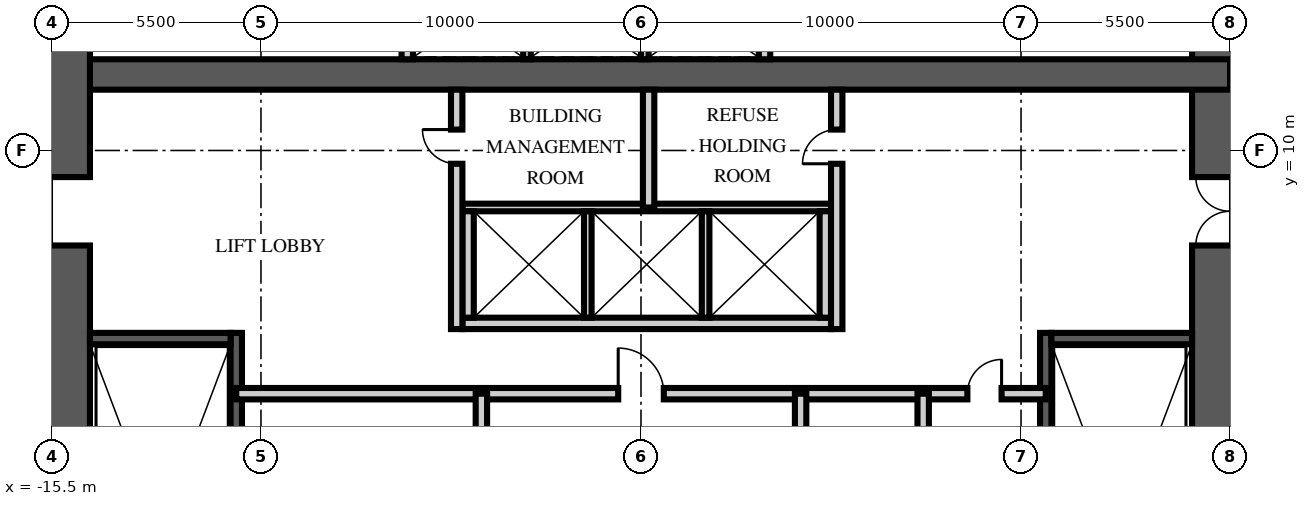
"""IFC4 building model, lengths in metres.
Left out: names, types, materials, properties, quantities, classifications, styles, units other than length and angle.
Written with IfcOpenShell. Run it as: python <this file> out.ifc"""

import sys

from ifc_helpers import new_model, si_unit, direction, frame, frame_2d, origin, place, context, subcontext, project, spatial, rectangle, extrude, element, fill, save


model = new_model("IFC4")
c1 = context("Model", 3, precision=1e-05, world=origin(), true_north=direction((0.0, 1.0)))
c2 = subcontext(c1, "Body", "Model", "MODEL_VIEW")
j1 = project(units=[si_unit("LENGTHUNIT", "METRE"), si_unit("PLANEANGLEUNIT", "RADIAN")], contexts=[c1])
p1 = place(None, origin())
s1 = spatial("IfcSite", under=j1, at=p1, CompositionType="ELEMENT")
p2 = place(p1, origin())
s2 = spatial("IfcBuilding", under=s1, at=p2, CompositionType="ELEMENT")
p3 = place(p2, frame((0.0, 0.0, 47.25)))
s3 = spatial("IfcBuildingStorey", under=s2, at=p3, CompositionType="ELEMENT", Elevation=47.25)
p4 = place(p3, frame((15.5, -15.5, -0.25), z_axis=(0.0, 0.0, 1.0), x_axis=(0.0, 1.0, 0.0)))
e1 = element("IfcWall", 1, at=p4, inside=s3, PredefinedType="SHEAR", context=c2, shape_type="SweptSolid", body=[
    extrude(rectangle(XDim=31.0, YDim=2.0, at=frame_2d((15.5, 0.0))), origin(), (0.0, 0.0, 1.0), 3.75),
])
p5 = place(p4, frame((6.5, 0.0, 0.25)))
e2 = element("IfcOpeningElement", 2, at=p5, cuts=e1, PredefinedType="OPENING", context=c2, shape_type="SweptSolid", body=[
    extrude(rectangle(XDim=1.2, YDim=2.1, at=frame_2d((0.6, 1.05))), frame((0.0, 1.01, 0.0), z_axis=(0.0, -1.0, 0.0), x_axis=(1.0, 0.0, 0.0)), (0.0, 0.0, 1.0), 2.02),
])
p6 = place(p4, frame((23.0, 0.0, 0.25)))
e3 = element("IfcOpeningElement", 3, at=p6, cuts=e1, PredefinedType="OPENING", context=c2, shape_type="SweptSolid", body=[
    extrude(rectangle(XDim=1.8, YDim=2.1, at=frame_2d((0.9, 1.05))), frame((0.0, 1.01, 0.0), z_axis=(0.0, -1.0, 0.0), x_axis=(1.0, 0.0, 0.0)), (0.0, 0.0, 1.0), 2.02),
])
p7 = place(p3, frame((-15.5, 12.0, -0.25), z_axis=(0.0, 0.0, 1.0), x_axis=(1.0, 0.0, 0.0)))
e4 = element("IfcWall", 4, at=p7, inside=s3, PredefinedType="SHEAR", context=c2, shape_type="SweptSolid", body=[
    extrude(rectangle(XDim=31.0, YDim=0.8, at=frame_2d((15.5, 0.0))), origin(), (0.0, 0.0, 1.0), 3.75),
])
p8 = place(p3, frame((-15.5, -15.5, -0.25), z_axis=(0.0, 0.0, 1.0), x_axis=(0.0, 1.0, 0.0)))
e5 = element("IfcWall", 5, at=p8, inside=s3, PredefinedType="SHEAR", context=c2, shape_type="SweptSolid", body=[
    extrude(rectangle(XDim=31.0, YDim=2.0, at=frame_2d((15.5, 0.0))), origin(), (0.0, 0.0, 1.0), 3.75),
])
p9 = place(p8, frame((6.5, 0.0, 0.25)))
e6 = element("IfcOpeningElement", 6, at=p9, cuts=e5, PredefinedType="OPENING", context=c2, shape_type="SweptSolid", body=[
    extrude(rectangle(XDim=1.2, YDim=2.1, at=frame_2d((0.6, 1.05))), frame((0.0, 1.01, 0.0), z_axis=(0.0, -1.0, 0.0), x_axis=(1.0, 0.0, 0.0)), (0.0, 0.0, 1.0), 2.02),
])
p10 = place(p8, frame((23.0, 0.0, 0.25)))
e7 = element("IfcOpeningElement", 7, at=p10, cuts=e5, PredefinedType="OPENING", context=c2, shape_type="SweptSolid", body=[
    extrude(rectangle(XDim=1.8, YDim=2.1, at=frame_2d((0.9, 1.05))), frame((0.0, 1.01, 0.0), z_axis=(0.0, -1.0, 0.0), x_axis=(1.0, 0.0, 0.0)), (0.0, 0.0, 1.0), 2.02),
])
p11 = place(p3, frame((-10.65, -4.9, 0.0), z_axis=(0.0, 0.0, 1.0), x_axis=(0.0, 1.0, 0.0)))
e8 = element("IfcWall", 8, at=p11, inside=s3, PredefinedType="SOLIDWALL", context=c2, shape_type="SweptSolid", body=[
    extrude(rectangle(XDim=10.1, YDim=0.3, at=frame_2d((5.05, 0.0))), origin(), (0.0, 0.0, 1.0), 3.5),
])
p12 = place(p3, frame((-14.5, 5.05, 0.0), z_axis=(0.0, 0.0, 1.0), x_axis=(1.0, 0.0, 0.0)))
e9 = element("IfcWall", 9, at=p12, inside=s3, PredefinedType="SOLIDWALL", context=c2, shape_type="SweptSolid", body=[
    extrude(rectangle(XDim=3.7, YDim=0.3, at=frame_2d((1.85, 0.0))), origin(), (0.0, 0.0, 1.0), 3.5),
])
p13 = place(p3, frame((10.65, -4.9, 0.0), z_axis=(0.0, 0.0, 1.0), x_axis=(0.0, 1.0, 0.0)))
e10 = element("IfcWall", 10, at=p13, inside=s3, PredefinedType="SOLIDWALL", context=c2, shape_type="SweptSolid", body=[
    extrude(rectangle(XDim=10.1, YDim=0.3, at=frame_2d((5.05, 0.0))), origin(), (0.0, 0.0, 1.0), 3.5),
])
p14 = place(p3, frame((14.5, 5.05, 0.0), z_axis=(0.0, 0.0, 1.0), x_axis=(-1.0, 0.0, 0.0)))
e11 = element("IfcWall", 11, at=p14, inside=s3, PredefinedType="SOLIDWALL", context=c2, shape_type="SweptSolid", body=[
    extrude(rectangle(XDim=3.7, YDim=0.3, at=frame_2d((1.85, 0.0))), origin(), (0.0, 0.0, 1.0), 3.5),
])
p15 = place(p3, frame((-4.7, 5.45, 0.0), z_axis=(0.0, 0.0, 1.0), x_axis=(1.0, 0.0, 0.0)))
e12 = element("IfcWall", 12, at=p15, inside=s3, PredefinedType="PARTITIONING", context=c2, shape_type="SweptSolid", body=[
    extrude(rectangle(XDim=9.7, YDim=0.3, at=frame_2d((4.85, 0.0))), origin(), (0.0, 0.0, 1.0), 3.5),
])
p16 = place(p3, frame((-4.7, 8.5, 0.0), z_axis=(0.0, 0.0, 1.0), x_axis=(1.0, 0.0, 0.0)))
e13 = element("IfcWall", 13, at=p16, inside=s3, PredefinedType="PARTITIONING", context=c2, shape_type="SweptSolid", body=[
    extrude(rectangle(XDim=9.7, YDim=0.2, at=frame_2d((4.85, 0.0))), origin(), (0.0, 0.0, 1.0), 3.5),
])
for number, where, z_axis, x_axis in (
    (14, (-4.55, 5.6, 0.0), (0.0, 0.0, 1.0), (0.0, 1.0, 0.0)),
    (15, (4.85, 5.6, 0.0), (0.0, 0.0, 1.0), (0.0, 1.0, 0.0)),
):
    element("IfcWall", number, at=place(p3, frame(where, z_axis=z_axis, x_axis=x_axis)), inside=s3, PredefinedType="PARTITIONING", context=c2, shape_type="SweptSolid", body=[
        extrude(rectangle(XDim=2.8, YDim=0.3, at=frame_2d((1.4, 0.0))), origin(), (0.0, 0.0, 1.0), 3.5),
    ])
for number, where, z_axis, x_axis in (
    (16, (-1.4, 5.6, 0.0), (0.0, 0.0, 1.0), (0.0, 1.0, 0.0)),
    (17, (1.7, 5.6, 0.0), (0.0, 0.0, 1.0), (0.0, 1.0, 0.0)),
):
    element("IfcWall", number, at=place(p3, frame(where, z_axis=z_axis, x_axis=x_axis)), inside=s3, PredefinedType="PARTITIONING", context=c2, shape_type="SweptSolid", body=[
        extrude(rectangle(XDim=2.8, YDim=0.2, at=frame_2d((1.4, 0.0))), origin(), (0.0, 0.0, 1.0), 3.5),
    ])
for number, where, z_axis, x_axis in (
    (18, (-6.15, 12.4, 0.0), (0.0, 0.0, 1.0), (0.0, 1.0, 0.0)),
    (19, (3.25, 12.4, 0.0), (0.0, 0.0, 1.0), (0.0, 1.0, 0.0)),
):
    element("IfcWall", number, at=place(p3, frame(where, z_axis=z_axis, x_axis=x_axis)), inside=s3, PredefinedType="PARTITIONING", context=c2, shape_type="SweptSolid", body=[
        extrude(rectangle(XDim=2.1, YDim=0.3, at=frame_2d((1.05, 0.0))), origin(), (0.0, 0.0, 1.0), 3.5),
    ])
for number, where, z_axis, x_axis in (
    (20, (-3.0, 12.4, 0.0), (0.0, 0.0, 1.0), (0.0, 1.0, 0.0)),
    (21, (0.1, 12.4, 0.0), (0.0, 0.0, 1.0), (0.0, 1.0, 0.0)),
):
    element("IfcWall", number, at=place(p3, frame(where, z_axis=z_axis, x_axis=x_axis)), inside=s3, PredefinedType="PARTITIONING", context=c2, shape_type="SweptSolid", body=[
        extrude(rectangle(XDim=2.1, YDim=0.2, at=frame_2d((1.05, 0.0))), origin(), (0.0, 0.0, 1.0), 3.5),
    ])
p17 = place(p3, frame((-10.65, 3.6, 0.0), z_axis=(0.0, 0.0, 1.0), x_axis=(1.0, 0.0, 0.0)))
e22 = element("IfcWall", 22, at=p17, inside=s3, PredefinedType="PARTITIONING", context=c2, shape_type="SweptSolid", body=[
    extrude(rectangle(XDim=21.3, YDim=0.3, at=frame_2d((10.65, 0.0))), origin(), (0.0, 0.0, 1.0), 3.5),
])
p18 = place(p17, frame((10.05, 0.0, 0.0)))
e23 = element("IfcOpeningElement", 23, at=p18, cuts=e22, PredefinedType="OPENING", context=c2, shape_type="SweptSolid", body=[
    extrude(rectangle(XDim=1.2, YDim=2.1, at=frame_2d((0.6, 1.05))), frame((0.0, 0.16, 0.0), z_axis=(0.0, -1.0, 0.0), x_axis=(1.0, 0.0, 0.0)), (0.0, 0.0, 1.0), 0.32),
])
p19 = place(p17, frame((19.238, 0.0, 0.0)))
e24 = element("IfcOpeningElement", 24, at=p19, cuts=e22, PredefinedType="OPENING", context=c2, shape_type="SweptSolid", body=[
    extrude(rectangle(XDim=0.9, YDim=2.1, at=frame_2d((0.45, 1.05))), frame((0.0, 0.16, 0.0), z_axis=(0.0, -1.0, 0.0), x_axis=(1.0, 0.0, 0.0)), (0.0, 0.0, 1.0), 0.32),
])
p20 = place(p3, frame((-4.2, -6.65, 0.0), z_axis=(0.0, 0.0, 1.0), x_axis=(0.0, 1.0, 0.0)))
e25 = element("IfcWall", 25, at=p20, inside=s3, PredefinedType="PARTITIONING", context=c2, shape_type="SweptSolid", body=[
    extrude(rectangle(XDim=10.25, YDim=0.3, at=frame_2d((5.125, 0.0))), origin(), (0.0, 0.0, 1.0), 3.5),
])
p21 = place(p20, frame((0.787, 0.0, 0.0)))
e26 = element("IfcOpeningElement", 26, at=p21, cuts=e25, PredefinedType="OPENING", context=c2, shape_type="SweptSolid", body=[
    extrude(rectangle(XDim=0.9, YDim=2.1, at=frame_2d((0.45, 1.05))), frame((0.0, 0.16, 0.0), z_axis=(0.0, -1.0, 0.0), x_axis=(1.0, 0.0, 0.0)), (0.0, 0.0, 1.0), 0.32),
])
p22 = place(p20, frame((5.912, 0.0, 0.0)))
e27 = element("IfcOpeningElement", 27, at=p22, cuts=e25, PredefinedType="OPENING", context=c2, shape_type="SweptSolid", body=[
    extrude(rectangle(XDim=0.9, YDim=2.1, at=frame_2d((0.45, 1.05))), frame((0.0, 0.16, 0.0), z_axis=(0.0, -1.0, 0.0), x_axis=(1.0, 0.0, 0.0)), (0.0, 0.0, 1.0), 0.32),
])
p23 = place(p3, frame((4.2, -6.65, 0.0), z_axis=(0.0, 0.0, 1.0), x_axis=(0.0, 1.0, 0.0)))
e28 = element("IfcWall", 28, at=p23, inside=s3, PredefinedType="PARTITIONING", context=c2, shape_type="SweptSolid", body=[
    extrude(rectangle(XDim=10.25, YDim=0.3, at=frame_2d((5.125, 0.0))), origin(), (0.0, 0.0, 1.0), 3.5),
])
p24 = place(p23, frame((2.15, 0.0, 0.0)))
e29 = element("IfcOpeningElement", 29, at=p24, cuts=e28, PredefinedType="OPENING", context=c2, shape_type="SweptSolid", body=[
    extrude(rectangle(XDim=0.9, YDim=2.1, at=frame_2d((0.45, 1.05))), frame((0.0, 0.16, 0.0), z_axis=(0.0, -1.0, 0.0), x_axis=(1.0, 0.0, 0.0)), (0.0, 0.0, 1.0), 0.32),
])
p25 = place(p23, frame((7.275, 0.0, 0.0)))
e30 = element("IfcOpeningElement", 30, at=p25, cuts=e28, PredefinedType="OPENING", context=c2, shape_type="SweptSolid", body=[
    extrude(rectangle(XDim=0.9, YDim=2.1, at=frame_2d((0.45, 1.05))), frame((0.0, 0.16, 0.0), z_axis=(0.0, -1.0, 0.0), x_axis=(1.0, 0.0, 0.0)), (0.0, 0.0, 1.0), 0.32),
])
p26 = place(p3, frame((7.425, -1.45, 0.0), z_axis=(0.0, 0.0, 1.0), x_axis=(0.0, 1.0, 0.0)))
e31 = element("IfcWall", 31, at=p26, inside=s3, PredefinedType="PARTITIONING", context=c2, shape_type="SweptSolid", body=[
    extrude(rectangle(XDim=5.05, YDim=0.3, at=frame_2d((2.525, 0.0))), origin(), (0.0, 0.0, 1.0), 3.5),
])
p27 = place(p3, frame((-4.85, 5.3, 0.0), z_axis=(0.0, 0.0, 1.0), x_axis=(0.0, 1.0, 0.0)))
e32 = element("IfcWall", 32, at=p27, inside=s3, PredefinedType="PARTITIONING", context=c2, shape_type="SweptSolid", body=[
    extrude(rectangle(XDim=6.3, YDim=0.3, at=frame_2d((3.15, 0.0))), origin(), (0.0, 0.0, 1.0), 3.5),
])
p28 = place(p27, frame((4.35, 0.0, 0.0)))
e33 = element("IfcOpeningElement", 33, at=p28, cuts=e32, PredefinedType="OPENING", context=c2, shape_type="SweptSolid", body=[
    extrude(rectangle(XDim=0.9, YDim=2.1, at=frame_2d((0.45, 1.05))), frame((0.0, 0.16, 0.0), z_axis=(0.0, -1.0, 0.0), x_axis=(1.0, 0.0, 0.0)), (0.0, 0.0, 1.0), 0.32),
])
p29 = place(p3, frame((5.15, 5.3, 0.0), z_axis=(0.0, 0.0, 1.0), x_axis=(0.0, 1.0, 0.0)))
e34 = element("IfcWall", 34, at=p29, inside=s3, PredefinedType="PARTITIONING", context=c2, shape_type="SweptSolid", body=[
    extrude(rectangle(XDim=6.3, YDim=0.3, at=frame_2d((3.15, 0.0))), origin(), (0.0, 0.0, 1.0), 3.5),
])
p30 = place(p29, frame((4.35, 0.0, 0.0)))
e35 = element("IfcOpeningElement", 35, at=p30, cuts=e34, PredefinedType="OPENING", context=c2, shape_type="SweptSolid", body=[
    extrude(rectangle(XDim=0.9, YDim=2.1, at=frame_2d((0.45, 1.05))), frame((0.0, 0.16, 0.0), z_axis=(0.0, -1.0, 0.0), x_axis=(1.0, 0.0, 0.0)), (0.0, 0.0, 1.0), 0.32),
])
p31 = place(p3, frame((0.2, 8.5, 0.0), z_axis=(0.0, 0.0, 1.0), x_axis=(0.0, 1.0, 0.0)))
e36 = element("IfcWall", 36, at=p31, inside=s3, PredefinedType="PARTITIONING", context=c2, shape_type="SweptSolid", body=[
    extrude(rectangle(XDim=3.1, YDim=0.3, at=frame_2d((1.55, 0.0))), origin(), (0.0, 0.0, 1.0), 3.5),
])
p32 = place(p10, origin())
e37 = element("IfcDoor", 37, at=p32, inside=s3, OperationType="DOUBLE_DOOR_SINGLE_SWING", PredefinedType="DOOR", context=c2, shape_type="SweptSolid", body=[
    extrude(rectangle(XDim=1.8, YDim=2.1, at=frame_2d((0.9, 1.05))), frame((0.0, 0.025, 0.0), z_axis=(0.0, -1.0, 0.0), x_axis=(1.0, 0.0, 0.0)), (0.0, 0.0, 1.0), 0.05),
])
fill(e7, e37)
p33 = place(p6, origin())
e38 = element("IfcDoor", 38, at=p33, inside=s3, OperationType="DOUBLE_DOOR_SINGLE_SWING", PredefinedType="DOOR", context=c2, shape_type="SweptSolid", body=[
    extrude(rectangle(XDim=1.8, YDim=2.1, at=frame_2d((0.9, 1.05))), frame((0.0, 0.025, 0.0), z_axis=(0.0, -1.0, 0.0), x_axis=(1.0, 0.0, 0.0)), (0.0, 0.0, 1.0), 0.05),
])
fill(e3, e38)
p34 = place(p18, origin())
e39 = element("IfcDoor", 39, at=p34, inside=s3, OperationType="SINGLE_SWING_LEFT", PredefinedType="DOOR", context=c2, shape_type="SweptSolid", body=[
    extrude(rectangle(XDim=1.2, YDim=2.1, at=frame_2d((0.6, 1.05))), frame((0.0, 0.025, 0.0), z_axis=(0.0, -1.0, 0.0), x_axis=(1.0, 0.0, 0.0)), (0.0, 0.0, 1.0), 0.05),
])
fill(e23, e39)
p35 = place(p19, origin())
e40 = element("IfcDoor", 40, at=p35, inside=s3, OperationType="SINGLE_SWING_RIGHT", PredefinedType="DOOR", context=c2, shape_type="SweptSolid", body=[
    extrude(rectangle(XDim=0.9, YDim=2.1, at=frame_2d((0.45, 1.05))), frame((0.0, 0.025, 0.0), z_axis=(0.0, -1.0, 0.0), x_axis=(1.0, 0.0, 0.0)), (0.0, 0.0, 1.0), 0.05),
])
fill(e24, e40)
p36 = place(p28, origin())
e41 = element("IfcDoor", 41, at=p36, inside=s3, OperationType="SINGLE_SWING_RIGHT", PredefinedType="DOOR", context=c2, shape_type="SweptSolid", body=[
    extrude(rectangle(XDim=0.9, YDim=2.1, at=frame_2d((0.45, 1.05))), frame((0.0, 0.025, 0.0), z_axis=(0.0, -1.0, 0.0), x_axis=(1.0, 0.0, 0.0)), (0.0, 0.0, 1.0), 0.05),
])
fill(e33, e41)
p37 = place(p30, origin())
e42 = element("IfcDoor", 42, at=p37, inside=s3, OperationType="SINGLE_SWING_LEFT", PredefinedType="DOOR", context=c2, shape_type="SweptSolid", body=[
    extrude(rectangle(XDim=0.9, YDim=2.1, at=frame_2d((0.45, 1.05))), frame((0.0, 0.025, 0.0), z_axis=(0.0, -1.0, 0.0), x_axis=(1.0, 0.0, 0.0)), (0.0, 0.0, 1.0), 0.05),
])
fill(e35, e42)
save(model, sys.argv[1])
